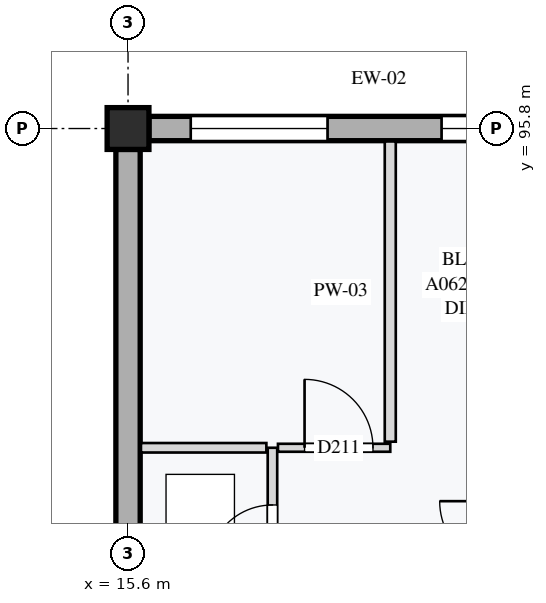
"""IFC4 building model, lengths in metres.
Left out: names, types, materials, properties, quantities, classifications, styles, units other than length and angle.
Written with IfcOpenShell. Run it as: python <this file> out.ifc"""

import sys

from ifc_helpers import new_model, si_unit, direction, frame, frame_2d, origin, origin_2d, place, context, subcontext, project, spatial, rectangle, extrude, element, fill, save


model = new_model("IFC4")
c1 = context("Model", 3, precision=1e-05, world=origin(), true_north=direction((0.0, 1.0)))
c2 = subcontext(c1, "Body", "Model", "MODEL_VIEW")
j1 = project(units=[si_unit("LENGTHUNIT", "METRE"), si_unit("PLANEANGLEUNIT", "RADIAN")], contexts=[c1])
p1 = place(None, origin())
s1 = spatial("IfcSite", under=j1, at=p1, CompositionType="ELEMENT")
p2 = place(p1, origin())
s2 = spatial("IfcBuilding", under=s1, at=p2, CompositionType="ELEMENT")
p3 = place(p2, frame((0.0, 0.0, 21.2)))
s3 = spatial("IfcBuildingStorey", under=s2, at=p3, CompositionType="ELEMENT", Elevation=21.2)
p4 = place(p3, frame((15.6, 95.8, 0.0), z_axis=(0.0, 0.0, 1.0), x_axis=(1.0, 0.0, 0.0)))
e1 = element("IfcColumn", 1, at=p4, inside=s3, PredefinedType="COLUMN", context=c2, shape_type="SweptSolid", body=[
    extrude(rectangle(XDim=0.55, YDim=0.55, at=origin_2d()), origin(), (0.0, 0.0, 1.0), 3.2),
])
p5 = place(p3, frame((15.875, 95.8, 0.0), z_axis=(0.0, 0.0, 1.0), x_axis=(1.0, 0.0, 0.0)))
e2 = element("IfcWall", 2, at=p5, inside=s3, PredefinedType="STANDARD", context=c2, shape_type="SweptSolid", body=[
    extrude(rectangle(XDim=6.05, YDim=0.32, at=frame_2d((3.025, 0.0))), origin(), (0.0, 0.0, 1.0), 2.6),
])
p6 = place(p5, frame((0.55, 0.0, 0.85)))
e3 = element("IfcOpeningElement", 3, at=p6, cuts=e2, PredefinedType="OPENING", context=c2, shape_type="SweptSolid", body=[
    extrude(rectangle(XDim=1.8, YDim=1.35, at=frame_2d((0.9, 0.675))), frame((0.0, 0.17, 0.0), z_axis=(0.0, -1.0, 0.0), x_axis=(1.0, 0.0, 0.0)), (0.0, 0.0, 1.0), 0.34),
])
p7 = place(p5, frame((3.85, 0.0, 0.85)))
e4 = element("IfcOpeningElement", 4, at=p7, cuts=e2, PredefinedType="OPENING", context=c2, shape_type="SweptSolid", body=[
    extrude(rectangle(XDim=1.8, YDim=1.55, at=frame_2d((0.9, 0.775))), frame((0.0, 0.17, 0.0), z_axis=(0.0, -1.0, 0.0), x_axis=(1.0, 0.0, 0.0)), (0.0, 0.0, 1.0), 0.34),
])
p8 = place(p3, frame((15.6, 89.475, 0.0), z_axis=(0.0, 0.0, 1.0), x_axis=(0.0, 1.0, 0.0)))
e5 = element("IfcWall", 5, at=p8, inside=s3, PredefinedType="STANDARD", context=c2, shape_type="SweptSolid", body=[
    extrude(rectangle(XDim=6.05, YDim=0.32, at=frame_2d((3.025, 0.0))), origin(), (0.0, 0.0, 1.0), 2.65),
])
p9 = place(p3, frame((17.5, 89.298, 0.0), z_axis=(0.0, 0.0, 1.0), x_axis=(0.0, 1.0, 0.0)))
e6 = element("IfcWall", 6, at=p9, inside=s3, PredefinedType="PARTITIONING", context=c2, shape_type="SweptSolid", body=[
    extrude(rectangle(XDim=2.302, YDim=0.125, at=frame_2d((1.151, 0.0))), origin(), (0.0, 0.0, 1.0), 2.96),
])
p10 = place(p9, frame((0.7, 0.0, 0.0)))
e7 = element("IfcOpeningElement", 7, at=p10, cuts=e6, PredefinedType="OPENING", context=c2, shape_type="SweptSolid", body=[
    extrude(rectangle(XDim=0.85, YDim=2.04, at=frame_2d((0.425, 1.02))), frame((0.0, 0.073, 0.0), z_axis=(0.0, -1.0, 0.0), x_axis=(1.0, 0.0, 0.0)), (0.0, 0.0, 1.0), 0.145),
])
p11 = place(p3, frame((15.77, 91.6, 0.0), z_axis=(0.0, 0.0, 1.0), x_axis=(1.0, 0.0, 0.0)))
e8 = element("IfcWall", 8, at=p11, inside=s3, PredefinedType="PARTITIONING", context=c2, shape_type="SweptSolid", body=[
    extrude(rectangle(XDim=1.65, YDim=0.125, at=frame_2d((0.825, 0.0))), origin(), (0.0, 0.0, 1.0), 2.96),
])
p12 = place(p3, frame((17.573, 91.6, 0.0), z_axis=(0.0, 0.0, 1.0), x_axis=(1.0, 0.0, 0.0)))
e9 = element("IfcWall", 9, at=p12, inside=s3, PredefinedType="PARTITIONING", context=c2, shape_type="SweptSolid", body=[
    extrude(rectangle(XDim=1.478, YDim=0.105, at=frame_2d((0.739, 0.0))), origin(), (0.0, 0.0, 1.0), 2.96),
])
p13 = place(p12, frame((0.35, 0.0, 0.0)))
e10 = element("IfcOpeningElement", 10, at=p13, cuts=e9, PredefinedType="OPENING", context=c2, shape_type="SweptSolid", body=[
    extrude(rectangle(XDim=0.9, YDim=2.16, at=frame_2d((0.45, 1.08))), frame((0.0, 0.062, 0.0), z_axis=(0.0, -1.0, 0.0), x_axis=(1.0, 0.0, 0.0)), (0.0, 0.0, 1.0), 0.125),
])
p14 = place(p3, frame((19.05, 91.68, 0.0), z_axis=(0.0, 0.0, 1.0), x_axis=(0.0, 1.0, 0.0)))
e11 = element("IfcWall", 11, at=p14, inside=s3, PredefinedType="PARTITIONING", context=c2, shape_type="SweptSolid", body=[
    extrude(rectangle(XDim=3.95, YDim=0.145, at=frame_2d((1.975, 0.0))), origin(), (0.0, 0.0, 1.0), 2.96),
])
p15 = place(p6, origin())
e12 = element("IfcWindow", 12, at=p15, inside=s3, PartitioningType="SINGLE_PANEL", PredefinedType="WINDOW", context=c2, shape_type="SweptSolid", body=[
    extrude(rectangle(XDim=1.8, YDim=1.35, at=frame_2d((0.9, 0.675))), frame((0.0, 0.03, 0.0), z_axis=(0.0, -1.0, 0.0), x_axis=(1.0, 0.0, 0.0)), (0.0, 0.0, 1.0), 0.06),
])
fill(e3, e12)
p16 = place(p7, origin())
e13 = element("IfcWindow", 13, at=p16, inside=s3, PartitioningType="SINGLE_PANEL", PredefinedType="WINDOW", context=c2, shape_type="SweptSolid", body=[
    extrude(rectangle(XDim=1.8, YDim=1.55, at=frame_2d((0.9, 0.775))), frame((0.0, 0.03, 0.0), z_axis=(0.0, -1.0, 0.0), x_axis=(1.0, 0.0, 0.0)), (0.0, 0.0, 1.0), 0.06),
])
fill(e4, e13)
p17 = place(p10, origin())
e14 = element("IfcDoor", 14, at=p17, inside=s3, OperationType="SINGLE_SWING_LEFT", PredefinedType="DOOR", context=c2, shape_type="SweptSolid", body=[
    extrude(rectangle(XDim=0.85, YDim=2.04, at=frame_2d((0.425, 1.02))), frame((0.0, 0.025, 0.0), z_axis=(0.0, -1.0, 0.0), x_axis=(1.0, 0.0, 0.0)), (0.0, 0.0, 1.0), 0.05),
])
fill(e7, e14)
p18 = place(p13, origin())
e15 = element("IfcDoor", 15, at=p18, inside=s3, OperationType="SINGLE_SWING_LEFT", PredefinedType="DOOR", context=c2, shape_type="SweptSolid", body=[
    extrude(rectangle(XDim=0.9, YDim=2.16, at=frame_2d((0.45, 1.08))), frame((0.0, 0.025, 0.0), z_axis=(0.0, -1.0, 0.0), x_axis=(1.0, 0.0, 0.0)), (0.0, 0.0, 1.0), 0.05),
])
fill(e10, e15)
save(model, sys.argv[1])
